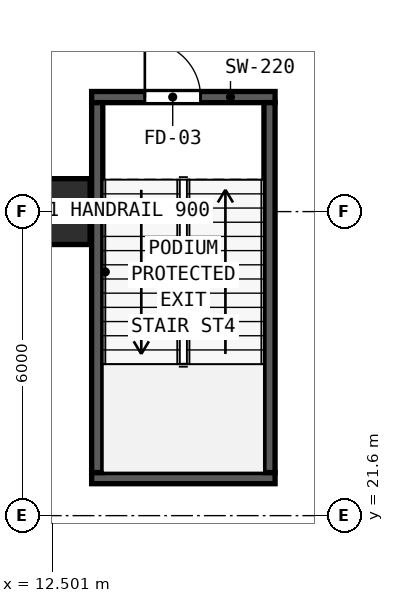
"""IFC4 building model, lengths in metres.
Left out: names, types, materials, properties, quantities, classifications, styles, units other than length and angle.
Written with IfcOpenShell. Run it as: python <this file> out.ifc"""

import sys

from ifc_helpers import new_model, si_unit, direction, frame, frame_2d, origin, origin_2d, place, context, subcontext, project, spatial, rectangle, hollow_rectangle, extrude, element, fill, save


model = new_model("IFC4")
c1 = context("Model", 3, precision=1e-05, world=origin(), true_north=direction((0.0, 1.0)))
c2 = subcontext(c1, "Body", "Model", "MODEL_VIEW")
j1 = project(units=[si_unit("LENGTHUNIT", "METRE"), si_unit("PLANEANGLEUNIT", "RADIAN")], contexts=[c1])
p1 = place(None, origin())
s1 = spatial("IfcSite", under=j1, at=p1, CompositionType="ELEMENT")
p2 = place(p1, origin())
s2 = spatial("IfcBuilding", under=s1, at=p2, CompositionType="ELEMENT")
p3 = place(p2, frame((0.0, 0.0, -4.8)))
s3 = spatial("IfcBuildingStorey", under=s2, at=p3, CompositionType="ELEMENT", Elevation=-4.8)
p4 = place(p3, frame((13.28, 29.86, 0.0), z_axis=(0.0, 0.0, 1.0), x_axis=(1.0, 0.0, 0.0)))
e1 = element("IfcWall", 1, at=p4, inside=s3, PredefinedType="SHEAR", context=c2, shape_type="SweptSolid", body=[
    extrude(rectangle(XDim=3.62, YDim=0.22, at=frame_2d((1.81, 0.0))), origin(), (0.0, 0.0, 1.0), 4.5),
])
p5 = place(p4, frame((1.05, 0.0, 0.0)))
e2 = element("IfcOpeningElement", 2, at=p5, cuts=e1, PredefinedType="OPENING", context=c2, shape_type="SweptSolid", body=[
    extrude(rectangle(XDim=1.1, YDim=2.15, at=frame_2d((0.55, 1.075))), frame((0.0, 0.12, 0.0), z_axis=(0.0, -1.0, 0.0), x_axis=(1.0, 0.0, 0.0)), (0.0, 0.0, 1.0), 0.24),
])
p6 = place(p3, frame((13.28, 22.34, 0.0), z_axis=(0.0, 0.0, 1.0), x_axis=(1.0, 0.0, 0.0)))
e3 = element("IfcWall", 3, at=p6, inside=s3, PredefinedType="SHEAR", context=c2, shape_type="SweptSolid", body=[
    extrude(rectangle(XDim=3.62, YDim=0.22, at=frame_2d((1.81, 0.0))), origin(), (0.0, 0.0, 1.0), 4.5),
])
for number, where, z_axis, x_axis in (
    (4, (13.39, 22.45, 0.0), (0.0, 0.0, 1.0), (0.0, 1.0, 0.0)),
    (5, (16.79, 22.45, 0.0), (0.0, 0.0, 1.0), (0.0, 1.0, 0.0)),
):
    element("IfcWall", number, at=place(p3, frame(where, z_axis=z_axis, x_axis=x_axis)), inside=s3, PredefinedType="SHEAR", context=c2, shape_type="SweptSolid", body=[
        extrude(rectangle(XDim=7.3, YDim=0.22, at=frame_2d((3.65, 0.0))), origin(), (0.0, 0.0, 1.0), 4.5),
    ])
p7 = place(p3, frame((12.6, 27.6, 0.0), z_axis=(0.0, 0.0, 1.0), x_axis=(1.0, 0.0, 0.0)))
e6 = element("IfcColumn", 6, at=p7, inside=s3, PredefinedType="COLUMN", context=c2, shape_type="SweptSolid", body=[
    extrude(hollow_rectangle(XDim=1.3, YDim=1.3, WallThickness=0.048, at=origin_2d()), origin(), (0.0, 0.0, 1.0), 4.8),
])
p8 = place(p5, origin())
e7 = element("IfcDoor", 7, at=p8, inside=s3, OperationType="SINGLE_SWING_LEFT", PredefinedType="DOOR", context=c2, shape_type="SweptSolid", body=[
    extrude(rectangle(XDim=1.1, YDim=2.15, at=frame_2d((0.55, 1.075))), frame((0.0, 0.025, 0.0), z_axis=(0.0, -1.0, 0.0), x_axis=(1.0, 0.0, 0.0)), (0.0, 0.0, 1.0), 0.05),
])
fill(e2, e7)
save(model, sys.argv[1])
